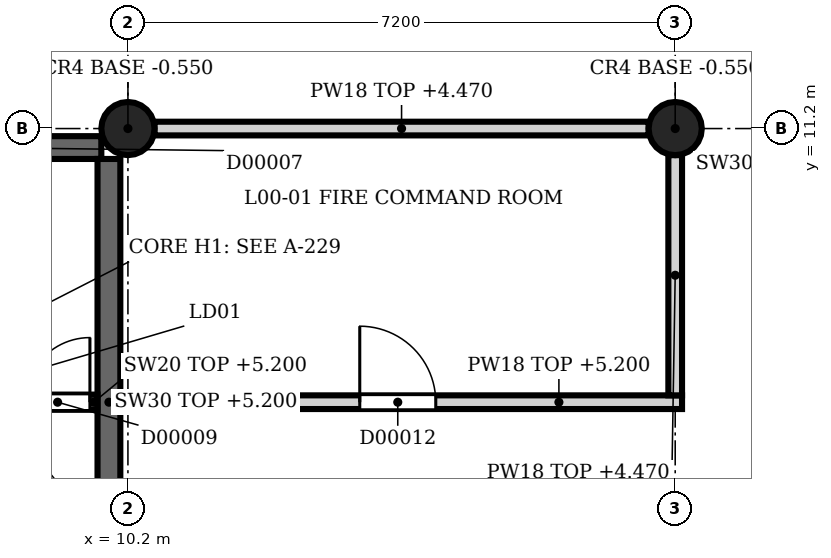
"""IFC4 building model, lengths in metres.
Left out: names, types, materials, properties, quantities, classifications, styles, units other than length and angle.
Written with IfcOpenShell. Run it as: python <this file> out.ifc"""

import sys

from ifc_helpers import new_model, si_unit, direction, frame, frame_2d, origin, origin_2d, place, context, subcontext, project, spatial, rectangle, circle, extrude, element, fill, save


model = new_model("IFC4")
c1 = context("Model", 3, precision=1e-05, world=origin(), true_north=direction((0.0, 1.0)))
c2 = subcontext(c1, "Body", "Model", "MODEL_VIEW")
j1 = project(units=[si_unit("LENGTHUNIT", "METRE"), si_unit("PLANEANGLEUNIT", "RADIAN")], contexts=[c1])
p1 = place(None, origin())
s1 = spatial("IfcSite", under=j1, at=p1, CompositionType="ELEMENT")
p2 = place(p1, origin())
s2 = spatial("IfcBuilding", under=s1, at=p2, CompositionType="ELEMENT")
p3 = place(p2, origin())
s3 = spatial("IfcBuildingStorey", under=s2, at=p3, CompositionType="ELEMENT", Elevation=0.0)
for number, where, z_axis, x_axis in (
    (1, (10.2, 11.2, -0.55), (0.0, 0.0, 1.0), (1.0, 0.0, 0.0)),
    (2, (17.4, 11.2, -0.55), (0.0, 0.0, 1.0), (1.0, 0.0, 0.0)),
):
    element("IfcColumn", number, at=place(p3, frame(where, z_axis=z_axis, x_axis=x_axis)), inside=s3, PredefinedType="COLUMN", context=c2, shape_type="SweptSolid", body=[
        extrude(circle(Radius=0.35, at=origin_2d()), origin(), (0.0, 0.0, 1.0), 5.95),
    ])
p4 = place(p3, frame((9.85, 10.95, 0.0), z_axis=(0.0, 0.0, 1.0), x_axis=(-1.0, 0.0, 0.0)))
e3 = element("IfcWall", 3, at=p4, inside=s3, PredefinedType="SHEAR", context=c2, shape_type="SweptSolid", body=[
    extrude(rectangle(XDim=6.5, YDim=0.3, at=frame_2d((3.25, 0.0))), origin(), (0.0, 0.0, 1.0), 5.2),
])
p5 = place(p4, frame((1.05, 0.0, 0.0)))
e4 = element("IfcOpeningElement", 4, at=p5, cuts=e3, PredefinedType="OPENING", context=c2, shape_type="SweptSolid", body=[
    extrude(rectangle(XDim=1.2, YDim=2.1, at=frame_2d((0.6, 1.05))), frame((0.0, 0.16, 0.0), z_axis=(0.0, -1.0, 0.0), x_axis=(1.0, 0.0, 0.0)), (0.0, 0.0, 1.0), 0.32),
])
p6 = place(p3, frame((9.95, 4.4, 0.0), z_axis=(0.0, 0.0, 1.0), x_axis=(0.0, 1.0, 0.0)))
e5 = element("IfcWall", 5, at=p6, inside=s3, PredefinedType="SHEAR", context=c2, shape_type="SweptSolid", body=[
    extrude(rectangle(XDim=6.4, YDim=0.3, at=frame_2d((3.2, 0.0))), origin(), (0.0, 0.0, 1.0), 5.2),
])
p7 = place(p3, frame((8.75, 7.6, 0.0), z_axis=(0.0, 0.0, 1.0), x_axis=(1.0, 0.0, 0.0)))
e6 = element("IfcWall", 6, at=p7, inside=s3, PredefinedType="SHEAR", context=c2, shape_type="SweptSolid", body=[
    extrude(rectangle(XDim=1.05, YDim=0.2, at=frame_2d((0.525, 0.0))), origin(), (0.0, 0.0, 1.0), 5.2),
])
p8 = place(p7, frame((0.1, 0.0, 0.0)))
e7 = element("IfcOpeningElement", 7, at=p8, cuts=e6, PredefinedType="OPENING", context=c2, shape_type="SweptSolid", body=[
    extrude(rectangle(XDim=0.85, YDim=2.1, at=frame_2d((0.425, 1.05))), frame((0.0, 0.11, 0.0), z_axis=(0.0, -1.0, 0.0), x_axis=(1.0, 0.0, 0.0)), (0.0, 0.0, 1.0), 0.22),
])
p9 = place(p3, frame((10.1, 7.6, 0.0), z_axis=(0.0, 0.0, 1.0), x_axis=(1.0, 0.0, 0.0)))
e8 = element("IfcWall", 8, at=p9, inside=s3, PredefinedType="PARTITIONING", context=c2, shape_type="SweptSolid", body=[
    extrude(rectangle(XDim=7.39, YDim=0.18, at=frame_2d((3.695, 0.0))), origin(), (0.0, 0.0, 1.0), 5.2),
])
p10 = place(p9, frame((3.15, 0.0, 0.0)))
e9 = element("IfcOpeningElement", 9, at=p10, cuts=e8, PredefinedType="OPENING", context=c2, shape_type="SweptSolid", body=[
    extrude(rectangle(XDim=1.0, YDim=2.1, at=frame_2d((0.5, 1.05))), frame((0.0, 0.1, 0.0), z_axis=(0.0, -1.0, 0.0), x_axis=(1.0, 0.0, 0.0)), (0.0, 0.0, 1.0), 0.2),
])
p11 = place(p3, frame((10.55, 11.2, 0.0), z_axis=(0.0, 0.0, 1.0), x_axis=(1.0, 0.0, 0.0)))
e10 = element("IfcWall", 10, at=p11, inside=s3, PredefinedType="PARTITIONING", context=c2, shape_type="SweptSolid", body=[
    extrude(rectangle(XDim=6.5, YDim=0.18, at=frame_2d((3.25, 0.0))), origin(), (0.0, 0.0, 1.0), 4.47),
])
p12 = place(p3, frame((17.4, 7.69, 0.0), z_axis=(0.0, 0.0, 1.0), x_axis=(0.0, 1.0, 0.0)))
e11 = element("IfcWall", 11, at=p12, inside=s3, PredefinedType="PARTITIONING", context=c2, shape_type="SweptSolid", body=[
    extrude(rectangle(XDim=3.16, YDim=0.18, at=frame_2d((1.58, 0.0))), origin(), (0.0, 0.0, 1.0), 4.47),
])
p13 = place(p8, origin())
e12 = element("IfcDoor", 12, at=p13, inside=s3, OperationType="SINGLE_SWING_LEFT", PredefinedType="DOOR", context=c2, shape_type="SweptSolid", body=[
    extrude(rectangle(XDim=0.85, YDim=2.1, at=frame_2d((0.425, 1.05))), frame((0.0, 0.025, 0.0), z_axis=(0.0, -1.0, 0.0), x_axis=(1.0, 0.0, 0.0)), (0.0, 0.0, 1.0), 0.05),
])
fill(e7, e12)
p14 = place(p10, origin())
e13 = element("IfcDoor", 13, at=p14, inside=s3, OperationType="SINGLE_SWING_LEFT", PredefinedType="DOOR", context=c2, shape_type="SweptSolid", body=[
    extrude(rectangle(XDim=1.0, YDim=2.1, at=frame_2d((0.5, 1.05))), frame((0.0, 0.025, 0.0), z_axis=(0.0, -1.0, 0.0), x_axis=(1.0, 0.0, 0.0)), (0.0, 0.0, 1.0), 0.05),
])
fill(e9, e13)
save(model, sys.argv[1])
